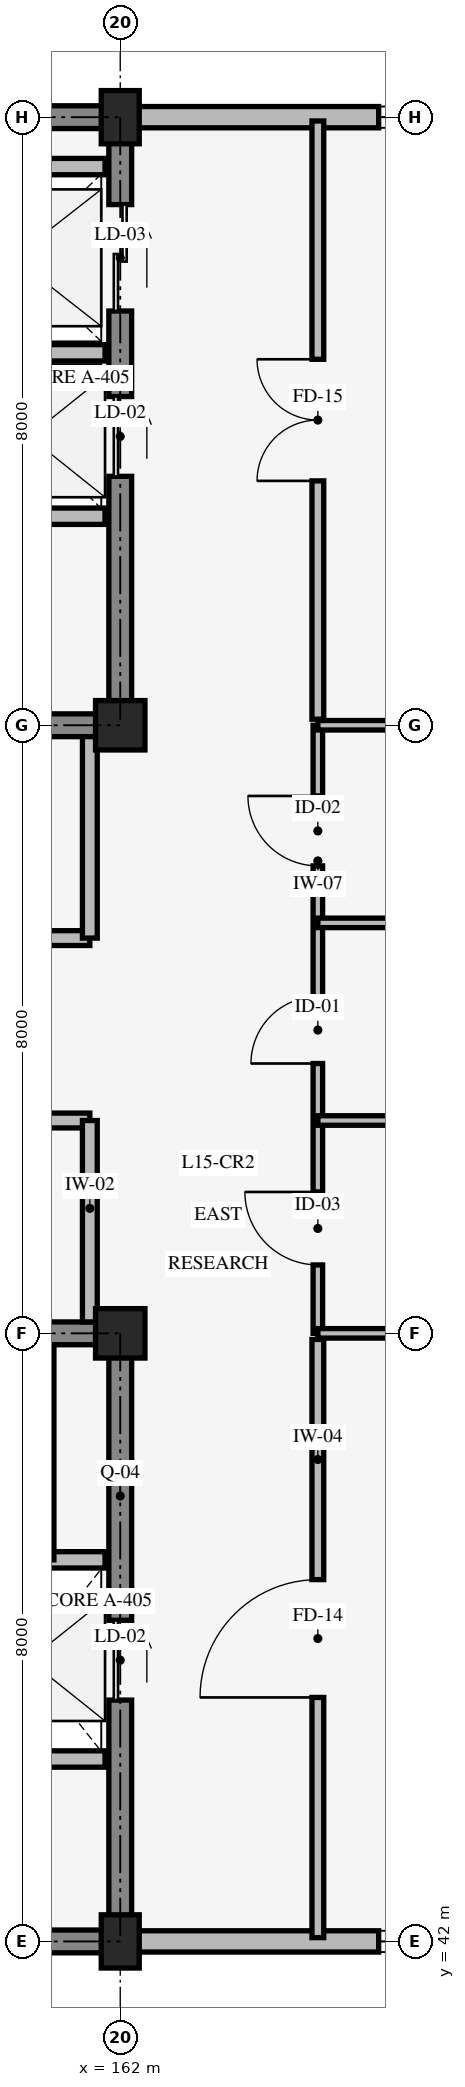
"""IFC4 building model, lengths in metres.
Left out: names, types, materials, properties, quantities, classifications, styles, units other than length and angle.
Written with IfcOpenShell. Run it as: python <this file> out.ifc"""

import sys

from ifc_helpers import new_model, si_unit, direction, frame, frame_2d, origin, origin_2d, place, context, subcontext, project, spatial, rectangle, extrude, element, fill, save


model = new_model("IFC4")
c1 = context("Model", 3, precision=1e-05, world=origin(), true_north=direction((0.0, 1.0)))
c2 = subcontext(c1, "Body", "Model", "MODEL_VIEW")
j1 = project(units=[si_unit("LENGTHUNIT", "METRE"), si_unit("PLANEANGLEUNIT", "RADIAN")], contexts=[c1])
p1 = place(None, origin())
s1 = spatial("IfcSite", under=j1, at=p1, CompositionType="ELEMENT")
p2 = place(p1, origin())
s2 = spatial("IfcBuilding", under=s1, at=p2, CompositionType="ELEMENT")
p3 = place(p2, frame((0.0, 0.0, 61.2)))
s3 = spatial("IfcBuildingStorey", under=s2, at=p3, CompositionType="ELEMENT", Elevation=61.2)
p4 = place(p3, frame((154.0, 42.0, 0.0), z_axis=(0.0, 0.0, 1.0), x_axis=(1.0, 0.0, 0.0)))
e1 = element("IfcWall", 1, at=p4, inside=s3, PredefinedType="SHEAR", context=c2, shape_type="SweptSolid", body=[
    extrude(rectangle(XDim=8.0, YDim=0.3, at=frame_2d((4.0, 0.0))), origin(), (0.0, 0.0, 1.0), 3.95),
])
p5 = place(p3, frame((162.0, 42.0, 0.0), z_axis=(0.0, 0.0, 1.0), x_axis=(0.0, 1.0, 0.0)))
e2 = element("IfcWall", 2, at=p5, inside=s3, PredefinedType="SHEAR", context=c2, shape_type="SweptSolid", body=[
    extrude(rectangle(XDim=8.0, YDim=0.3, at=frame_2d((4.0, 0.0))), origin(), (0.0, 0.0, 1.0), 3.95),
])
p6 = place(p5, frame((3.175, 0.0, 0.0)))
e3 = element("IfcOpeningElement", 3, at=p6, cuts=e2, PredefinedType="OPENING", context=c2, shape_type="SweptSolid", body=[
    extrude(rectangle(XDim=1.05, YDim=2.2, at=frame_2d((0.525, 1.1))), frame((0.0, 0.16, 0.0), z_axis=(0.0, -1.0, 0.0), x_axis=(1.0, 0.0, 0.0)), (0.0, 0.0, 1.0), 0.32),
])
p7 = place(p3, frame((162.0, 50.0, 0.0), z_axis=(0.0, 0.0, 1.0), x_axis=(-1.0, 0.0, 0.0)))
e4 = element("IfcWall", 4, at=p7, inside=s3, PredefinedType="SHEAR", context=c2, shape_type="SweptSolid", body=[
    extrude(rectangle(XDim=8.0, YDim=0.3, at=frame_2d((4.0, 0.0))), origin(), (0.0, 0.0, 1.0), 3.95),
])
p8 = place(p7, frame((5.3, 0.0, 0.0)))
e5 = element("IfcOpeningElement", 5, at=p8, cuts=e4, PredefinedType="OPENING", context=c2, shape_type="SweptSolid", body=[
    extrude(rectangle(XDim=1.3, YDim=2.15, at=frame_2d((0.65, 1.075))), frame((0.0, 0.16, 0.0), z_axis=(0.0, -1.0, 0.0), x_axis=(1.0, 0.0, 0.0)), (0.0, 0.0, 1.0), 0.32),
])
p9 = place(p7, frame((1.45, 0.0, 0.0)))
e6 = element("IfcOpeningElement", 6, at=p9, cuts=e4, PredefinedType="OPENING", context=c2, shape_type="SweptSolid", body=[
    extrude(rectangle(XDim=1.1, YDim=2.2, at=frame_2d((0.55, 1.1))), frame((0.0, 0.16, 0.0), z_axis=(0.0, -1.0, 0.0), x_axis=(1.0, 0.0, 0.0)), (0.0, 0.0, 1.0), 0.32),
])
p10 = place(p3, frame((154.0, 58.0, 0.0), z_axis=(0.0, 0.0, 1.0), x_axis=(1.0, 0.0, 0.0)))
e7 = element("IfcWall", 7, at=p10, inside=s3, PredefinedType="SHEAR", context=c2, shape_type="SweptSolid", body=[
    extrude(rectangle(XDim=8.0, YDim=0.3, at=frame_2d((4.0, 0.0))), origin(), (0.0, 0.0, 1.0), 3.95),
])
p11 = place(p10, frame((1.4, 0.0, 0.0)))
e8 = element("IfcOpeningElement", 8, at=p11, cuts=e7, PredefinedType="OPENING", context=c2, shape_type="SweptSolid", body=[
    extrude(rectangle(XDim=1.3, YDim=2.15, at=frame_2d((0.65, 1.075))), frame((0.0, 0.16, 0.0), z_axis=(0.0, -1.0, 0.0), x_axis=(1.0, 0.0, 0.0)), (0.0, 0.0, 1.0), 0.32),
])
p12 = place(p10, frame((5.3, 0.0, 0.0)))
e9 = element("IfcOpeningElement", 9, at=p12, cuts=e7, PredefinedType="OPENING", context=c2, shape_type="SweptSolid", body=[
    extrude(rectangle(XDim=1.1, YDim=2.2, at=frame_2d((0.55, 1.1))), frame((0.0, 0.16, 0.0), z_axis=(0.0, -1.0, 0.0), x_axis=(1.0, 0.0, 0.0)), (0.0, 0.0, 1.0), 0.32),
])
p13 = place(p3, frame((162.0, 58.0, 0.0), z_axis=(0.0, 0.0, 1.0), x_axis=(0.0, 1.0, 0.0)))
e10 = element("IfcWall", 10, at=p13, inside=s3, PredefinedType="SHEAR", context=c2, shape_type="SweptSolid", body=[
    extrude(rectangle(XDim=8.0, YDim=0.3, at=frame_2d((4.0, 0.0))), origin(), (0.0, 0.0, 1.0), 3.95),
])
p14 = place(p13, frame((3.275, 0.0, 0.0)))
e11 = element("IfcOpeningElement", 11, at=p14, cuts=e10, PredefinedType="OPENING", context=c2, shape_type="SweptSolid", body=[
    extrude(rectangle(XDim=1.05, YDim=2.2, at=frame_2d((0.525, 1.1))), frame((0.0, 0.16, 0.0), z_axis=(0.0, -1.0, 0.0), x_axis=(1.0, 0.0, 0.0)), (0.0, 0.0, 1.0), 0.32),
])
p15 = place(p13, frame((5.45, 0.0, 0.0)))
e12 = element("IfcOpeningElement", 12, at=p15, cuts=e10, PredefinedType="OPENING", context=c2, shape_type="SweptSolid", body=[
    extrude(rectangle(XDim=1.4, YDim=2.3, at=frame_2d((0.7, 1.15))), frame((0.0, 0.16, 0.0), z_axis=(0.0, -1.0, 0.0), x_axis=(1.0, 0.0, 0.0)), (0.0, 0.0, 1.0), 0.32),
])
p16 = place(p3, frame((162.0, 66.0, 0.0), z_axis=(0.0, 0.0, 1.0), x_axis=(-1.0, 0.0, 0.0)))
e13 = element("IfcWall", 13, at=p16, inside=s3, PredefinedType="SHEAR", context=c2, shape_type="SweptSolid", body=[
    extrude(rectangle(XDim=8.0, YDim=0.3, at=frame_2d((4.0, 0.0))), origin(), (0.0, 0.0, 1.0), 3.95),
])
p17 = place(p3, frame((162.0, 42.0, 0.0), z_axis=(0.0, 0.0, 1.0), x_axis=(1.0, 0.0, 0.0)))
e14 = element("IfcColumn", 14, at=p17, inside=s3, PredefinedType="COLUMN", context=c2, shape_type="SweptSolid", body=[
    extrude(rectangle(XDim=0.5, YDim=0.7, at=origin_2d()), origin(), (0.0, 0.0, 1.0), 4.2),
])
for number, where, z_axis, x_axis in (
    (15, (162.0, 50.0, 0.0), (0.0, 0.0, 1.0), (1.0, 0.0, 0.0)),
    (16, (162.0, 58.0, 0.0), (0.0, 0.0, 1.0), (1.0, 0.0, 0.0)),
):
    element("IfcColumn", number, at=place(p3, frame(where, z_axis=z_axis, x_axis=x_axis)), inside=s3, PredefinedType="COLUMN", context=c2, shape_type="SweptSolid", body=[
        extrude(rectangle(XDim=0.65, YDim=0.65, at=origin_2d()), origin(), (0.0, 0.0, 1.0), 4.2),
    ])
p18 = place(p3, frame((162.0, 66.0, 0.0), z_axis=(0.0, 0.0, 1.0), x_axis=(1.0, 0.0, 0.0)))
e17 = element("IfcColumn", 17, at=p18, inside=s3, PredefinedType="COLUMN", context=c2, shape_type="SweptSolid", body=[
    extrude(rectangle(XDim=0.5, YDim=0.7, at=origin_2d()), origin(), (0.0, 0.0, 1.0), 4.2),
])
p19 = place(p3, frame((170.0, 42.0, 0.0), z_axis=(0.0, 0.0, 1.0), x_axis=(-1.0, 0.0, 0.0)))
e18 = element("IfcWall", 18, at=p19, inside=s3, PredefinedType="STANDARD", context=c2, shape_type="SweptSolid", body=[
    extrude(rectangle(XDim=8.0, YDim=0.28, at=frame_2d((4.0, 0.0))), origin(), (0.0, 0.0, 1.0), 3.24),
])
p20 = place(p19, frame((3.4, 0.0, 0.85)))
e19 = element("IfcOpeningElement", 19, at=p20, cuts=e18, PredefinedType="OPENING", context=c2, shape_type="SweptSolid", body=[
    extrude(rectangle(XDim=1.2, YDim=1.2, at=frame_2d((0.6, 0.6))), frame((0.0, 0.15, 0.0), z_axis=(0.0, -1.0, 0.0), x_axis=(1.0, 0.0, 0.0)), (0.0, 0.0, 1.0), 0.3),
])
p21 = place(p3, frame((162.0, 66.0, 0.0), z_axis=(0.0, 0.0, 1.0), x_axis=(1.0, 0.0, 0.0)))
e20 = element("IfcWall", 20, at=p21, inside=s3, PredefinedType="STANDARD", context=c2, shape_type="SweptSolid", body=[
    extrude(rectangle(XDim=8.0, YDim=0.28, at=frame_2d((4.0, 0.0))), origin(), (0.0, 0.0, 1.0), 3.24),
])
p22 = place(p21, frame((3.4, 0.0, 0.85)))
e21 = element("IfcOpeningElement", 21, at=p22, cuts=e20, PredefinedType="OPENING", context=c2, shape_type="SweptSolid", body=[
    extrude(rectangle(XDim=1.2, YDim=1.2, at=frame_2d((0.6, 0.6))), frame((0.0, 0.15, 0.0), z_axis=(0.0, -1.0, 0.0), x_axis=(1.0, 0.0, 0.0)), (0.0, 0.0, 1.0), 0.3),
])
p23 = place(p3, frame((158.45, 47.02, 0.0), z_axis=(0.0, 0.0, 1.0), x_axis=(1.0, 0.0, 0.0)))
e22 = element("IfcWall", 22, at=p23, inside=s3, PredefinedType="STANDARD", context=c2, shape_type="SweptSolid", body=[
    extrude(rectangle(XDim=3.35, YDim=0.215, at=frame_2d((1.675, 0.0))), origin(), (0.0, 0.0, 1.0), 3.9),
])
p24 = place(p3, frame((161.02, 47.02, 0.0), z_axis=(0.0, 0.0, 1.0), x_axis=(0.0, 1.0, 0.0)))
e23 = element("IfcWall", 23, at=p24, inside=s3, PredefinedType="STANDARD", context=c2, shape_type="SweptSolid", body=[
    extrude(rectangle(XDim=2.78, YDim=0.215, at=frame_2d((1.39, 0.0))), origin(), (0.0, 0.0, 1.0), 3.9),
])
p25 = place(p3, frame((159.78, 44.4, 0.0), z_axis=(0.0, 0.0, 1.0), x_axis=(1.0, 0.0, 0.0)))
e24 = element("IfcWall", 24, at=p25, inside=s3, PredefinedType="STANDARD", context=c2, shape_type="SweptSolid", body=[
    extrude(rectangle(XDim=2.02, YDim=0.215, at=frame_2d((1.01, 0.0))), origin(), (0.0, 0.0, 1.0), 3.9),
])
p26 = place(p3, frame((158.45, 62.9, 0.0), z_axis=(0.0, 0.0, 1.0), x_axis=(1.0, 0.0, 0.0)))
e25 = element("IfcWall", 25, at=p26, inside=s3, PredefinedType="STANDARD", context=c2, shape_type="SweptSolid", body=[
    extrude(rectangle(XDim=3.35, YDim=0.215, at=frame_2d((1.675, 0.0))), origin(), (0.0, 0.0, 1.0), 3.9),
])
p27 = place(p3, frame((159.38, 65.35, 0.0), z_axis=(0.0, 0.0, 1.0), x_axis=(1.0, 0.0, 0.0)))
e26 = element("IfcWall", 26, at=p27, inside=s3, PredefinedType="STANDARD", context=c2, shape_type="SweptSolid", body=[
    extrude(rectangle(XDim=2.42, YDim=0.215, at=frame_2d((1.21, 0.0))), origin(), (0.0, 0.0, 1.0), 3.9),
])
p28 = place(p3, frame((158.45, 60.75, 0.0), z_axis=(0.0, 0.0, 1.0), x_axis=(1.0, 0.0, 0.0)))
e27 = element("IfcWall", 27, at=p28, inside=s3, PredefinedType="STANDARD", context=c2, shape_type="SweptSolid", body=[
    extrude(rectangle(XDim=3.35, YDim=0.215, at=frame_2d((1.675, 0.0))), origin(), (0.0, 0.0, 1.0), 3.9),
])
p29 = place(p3, frame((154.0, 52.8, 0.0), z_axis=(0.0, 0.0, 1.0), x_axis=(1.0, 0.0, 0.0)))
e28 = element("IfcWall", 28, at=p29, inside=s3, PredefinedType="STANDARD", context=c2, shape_type="SweptSolid", body=[
    extrude(rectangle(XDim=7.6, YDim=0.195, at=frame_2d((3.8, 0.0))), origin(), (0.0, 0.0, 1.0), 3.9),
])
p30 = place(p29, frame((2.8, 0.0, 0.0)))
e29 = element("IfcOpeningElement", 29, at=p30, cuts=e28, PredefinedType="OPENING", context=c2, shape_type="SweptSolid", body=[
    extrude(rectangle(XDim=1.35, YDim=2.15, at=frame_2d((0.675, 1.075))), frame((0.0, 0.107, 0.0), z_axis=(0.0, -1.0, 0.0), x_axis=(1.0, 0.0, 0.0)), (0.0, 0.0, 1.0), 0.215),
])
p31 = place(p3, frame((161.6, 50.15, 0.0), z_axis=(0.0, 0.0, 1.0), x_axis=(0.0, 1.0, 0.0)))
e30 = element("IfcWall", 30, at=p31, inside=s3, PredefinedType="STANDARD", context=c2, shape_type="SweptSolid", body=[
    extrude(rectangle(XDim=2.65, YDim=0.195, at=frame_2d((1.325, 0.0))), origin(), (0.0, 0.0, 1.0), 3.29),
])
p32 = place(p3, frame((154.0, 55.2, 0.0), z_axis=(0.0, 0.0, 1.0), x_axis=(1.0, 0.0, 0.0)))
e31 = element("IfcWall", 31, at=p32, inside=s3, PredefinedType="STANDARD", context=c2, shape_type="SweptSolid", body=[
    extrude(rectangle(XDim=7.6, YDim=0.195, at=frame_2d((3.8, 0.0))), origin(), (0.0, 0.0, 1.0), 3.9),
])
p33 = place(p32, frame((2.8, 0.0, 0.0)))
e32 = element("IfcOpeningElement", 32, at=p33, cuts=e31, PredefinedType="OPENING", context=c2, shape_type="SweptSolid", body=[
    extrude(rectangle(XDim=1.45, YDim=2.2, at=frame_2d((0.725, 1.1))), frame((0.0, 0.107, 0.0), z_axis=(0.0, -1.0, 0.0), x_axis=(1.0, 0.0, 0.0)), (0.0, 0.0, 1.0), 0.215),
])
p34 = place(p3, frame((161.6, 55.2, 0.0), z_axis=(0.0, 0.0, 1.0), x_axis=(0.0, 1.0, 0.0)))
e33 = element("IfcWall", 33, at=p34, inside=s3, PredefinedType="STANDARD", context=c2, shape_type="SweptSolid", body=[
    extrude(rectangle(XDim=2.65, YDim=0.195, at=frame_2d((1.325, 0.0))), origin(), (0.0, 0.0, 1.0), 3.29),
])
p35 = place(p3, frame((164.6, 50.0, 0.0), z_axis=(0.0, 0.0, 1.0), x_axis=(0.0, 1.0, 0.0)))
e34 = element("IfcWall", 34, at=p35, inside=s3, PredefinedType="STANDARD", context=c2, shape_type="SweptSolid", body=[
    extrude(rectangle(XDim=8.0, YDim=0.125, at=frame_2d((4.0, 0.0))), origin(), (0.0, 0.0, 1.0), 3.9),
])
p36 = place(p35, frame((0.9, 0.0, 0.0)))
e35 = element("IfcOpeningElement", 35, at=p36, cuts=e34, PredefinedType="OPENING", context=c2, shape_type="SweptSolid", body=[
    extrude(rectangle(XDim=0.96, YDim=2.08, at=frame_2d((0.48, 1.04))), frame((0.0, 0.073, 0.0), z_axis=(0.0, -1.0, 0.0), x_axis=(1.0, 0.0, 0.0)), (0.0, 0.0, 1.0), 0.145),
])
p37 = place(p35, frame((3.55, 0.0, 0.0)))
e36 = element("IfcOpeningElement", 36, at=p37, cuts=e34, PredefinedType="OPENING", context=c2, shape_type="SweptSolid", body=[
    extrude(rectangle(XDim=0.88, YDim=2.05, at=frame_2d((0.44, 1.025))), frame((0.0, 0.073, 0.0), z_axis=(0.0, -1.0, 0.0), x_axis=(1.0, 0.0, 0.0)), (0.0, 0.0, 1.0), 0.145),
])
p38 = place(p35, frame((6.15, 0.0, 0.0)))
e37 = element("IfcOpeningElement", 37, at=p38, cuts=e34, PredefinedType="OPENING", context=c2, shape_type="SweptSolid", body=[
    extrude(rectangle(XDim=0.92, YDim=2.05, at=frame_2d((0.46, 1.025))), frame((0.0, 0.073, 0.0), z_axis=(0.0, -1.0, 0.0), x_axis=(1.0, 0.0, 0.0)), (0.0, 0.0, 1.0), 0.145),
])
p39 = place(p3, frame((164.6, 50.0, 0.0), z_axis=(0.0, 0.0, 1.0), x_axis=(1.0, 0.0, 0.0)))
e38 = element("IfcWall", 38, at=p39, inside=s3, PredefinedType="STANDARD", context=c2, shape_type="SweptSolid", body=[
    extrude(rectangle(XDim=3.8, YDim=0.125, at=frame_2d((1.9, 0.0))), origin(), (0.0, 0.0, 1.0), 3.24),
])
for number, where, z_axis, x_axis in (
    (39, (164.6, 52.8, 0.0), (0.0, 0.0, 1.0), (1.0, 0.0, 0.0)),
    (40, (164.6, 55.4, 0.0), (0.0, 0.0, 1.0), (1.0, 0.0, 0.0)),
):
    element("IfcWall", number, at=place(p3, frame(where, z_axis=z_axis, x_axis=x_axis)), inside=s3, PredefinedType="STANDARD", context=c2, shape_type="SweptSolid", body=[
        extrude(rectangle(XDim=3.8, YDim=0.125, at=frame_2d((1.9, 0.0))), origin(), (0.0, 0.0, 1.0), 3.9),
    ])
p40 = place(p3, frame((164.6, 58.0, 0.0), z_axis=(0.0, 0.0, 1.0), x_axis=(1.0, 0.0, 0.0)))
e41 = element("IfcWall", 41, at=p40, inside=s3, PredefinedType="STANDARD", context=c2, shape_type="SweptSolid", body=[
    extrude(rectangle(XDim=3.8, YDim=0.125, at=frame_2d((1.9, 0.0))), origin(), (0.0, 0.0, 1.0), 3.24),
])
p41 = place(p3, frame((164.6, 42.05, 0.0), z_axis=(0.0, 0.0, 1.0), x_axis=(0.0, 1.0, 0.0)))
e42 = element("IfcWall", 42, at=p41, inside=s3, PredefinedType="STANDARD", context=c2, shape_type="SweptSolid", body=[
    extrude(rectangle(XDim=7.87, YDim=0.155, at=frame_2d((3.935, 0.0))), origin(), (0.0, 0.0, 1.0), 3.9),
])
p42 = place(p41, frame((3.16, 0.0, 0.0)))
e43 = element("IfcOpeningElement", 43, at=p42, cuts=e42, PredefinedType="OPENING", context=c2, shape_type="SweptSolid", body=[
    extrude(rectangle(XDim=1.55, YDim=2.25, at=frame_2d((0.775, 1.125))), frame((0.0, 0.087, 0.0), z_axis=(0.0, -1.0, 0.0), x_axis=(1.0, 0.0, 0.0)), (0.0, 0.0, 1.0), 0.175),
])
p43 = place(p3, frame((164.6, 58.08, 0.0), z_axis=(0.0, 0.0, 1.0), x_axis=(0.0, 1.0, 0.0)))
e44 = element("IfcWall", 44, at=p43, inside=s3, PredefinedType="STANDARD", context=c2, shape_type="SweptSolid", body=[
    extrude(rectangle(XDim=7.87, YDim=0.155, at=frame_2d((3.935, 0.0))), origin(), (0.0, 0.0, 1.0), 3.9),
])
p44 = place(p43, frame((3.135, 0.0, 0.0)))
e45 = element("IfcOpeningElement", 45, at=p44, cuts=e44, PredefinedType="OPENING", context=c2, shape_type="SweptSolid", body=[
    extrude(rectangle(XDim=1.6, YDim=2.25, at=frame_2d((0.8, 1.125))), frame((0.0, 0.087, 0.0), z_axis=(0.0, -1.0, 0.0), x_axis=(1.0, 0.0, 0.0)), (0.0, 0.0, 1.0), 0.175),
])
p45 = place(p20, origin())
e46 = element("IfcWindow", 46, at=p45, inside=s3, PartitioningType="SINGLE_PANEL", PredefinedType="WINDOW", context=c2, shape_type="SweptSolid", body=[
    extrude(rectangle(XDim=1.2, YDim=1.2, at=frame_2d((0.6, 0.6))), frame((0.0, 0.03, 0.0), z_axis=(0.0, -1.0, 0.0), x_axis=(1.0, 0.0, 0.0)), (0.0, 0.0, 1.0), 0.06),
])
fill(e19, e46)
p46 = place(p22, origin())
e47 = element("IfcWindow", 47, at=p46, inside=s3, PartitioningType="SINGLE_PANEL", PredefinedType="WINDOW", context=c2, shape_type="SweptSolid", body=[
    extrude(rectangle(XDim=1.2, YDim=1.2, at=frame_2d((0.6, 0.6))), frame((0.0, 0.03, 0.0), z_axis=(0.0, -1.0, 0.0), x_axis=(1.0, 0.0, 0.0)), (0.0, 0.0, 1.0), 0.06),
])
fill(e21, e47)
p47 = place(p6, origin())
e48 = element("IfcDoor", 48, at=p47, inside=s3, OperationType="SLIDING_TO_LEFT", PredefinedType="DOOR", context=c2, shape_type="SweptSolid", body=[
    extrude(rectangle(XDim=1.05, YDim=2.2, at=frame_2d((0.525, 1.1))), frame((0.0, 0.025, 0.0), z_axis=(0.0, -1.0, 0.0), x_axis=(1.0, 0.0, 0.0)), (0.0, 0.0, 1.0), 0.05),
])
fill(e3, e48)
p48 = place(p14, origin())
e49 = element("IfcDoor", 49, at=p48, inside=s3, OperationType="SLIDING_TO_RIGHT", PredefinedType="DOOR", context=c2, shape_type="SweptSolid", body=[
    extrude(rectangle(XDim=1.05, YDim=2.2, at=frame_2d((0.525, 1.1))), frame((0.0, 0.025, 0.0), z_axis=(0.0, -1.0, 0.0), x_axis=(1.0, 0.0, 0.0)), (0.0, 0.0, 1.0), 0.05),
])
fill(e11, e49)
p49 = place(p15, origin())
e50 = element("IfcDoor", 50, at=p49, inside=s3, OperationType="DOUBLE_DOOR_SLIDING", PredefinedType="DOOR", context=c2, shape_type="SweptSolid", body=[
    extrude(rectangle(XDim=1.4, YDim=2.3, at=frame_2d((0.7, 1.15))), frame((0.0, 0.025, 0.0), z_axis=(0.0, -1.0, 0.0), x_axis=(1.0, 0.0, 0.0)), (0.0, 0.0, 1.0), 0.05),
])
fill(e12, e50)
p50 = place(p36, origin())
e51 = element("IfcDoor", 51, at=p50, inside=s3, OperationType="SINGLE_SWING_RIGHT", PredefinedType="DOOR", context=c2, shape_type="SweptSolid", body=[
    extrude(rectangle(XDim=0.96, YDim=2.08, at=frame_2d((0.48, 1.04))), frame((0.0, 0.025, 0.0), z_axis=(0.0, -1.0, 0.0), x_axis=(1.0, 0.0, 0.0)), (0.0, 0.0, 1.0), 0.05),
])
fill(e35, e51)
p51 = place(p37, origin())
e52 = element("IfcDoor", 52, at=p51, inside=s3, OperationType="SINGLE_SWING_LEFT", PredefinedType="DOOR", context=c2, shape_type="SweptSolid", body=[
    extrude(rectangle(XDim=0.88, YDim=2.05, at=frame_2d((0.44, 1.025))), frame((0.0, 0.025, 0.0), z_axis=(0.0, -1.0, 0.0), x_axis=(1.0, 0.0, 0.0)), (0.0, 0.0, 1.0), 0.05),
])
fill(e36, e52)
p52 = place(p38, origin())
e53 = element("IfcDoor", 53, at=p52, inside=s3, OperationType="SINGLE_SWING_RIGHT", PredefinedType="DOOR", context=c2, shape_type="SweptSolid", body=[
    extrude(rectangle(XDim=0.92, YDim=2.05, at=frame_2d((0.46, 1.025))), frame((0.0, 0.025, 0.0), z_axis=(0.0, -1.0, 0.0), x_axis=(1.0, 0.0, 0.0)), (0.0, 0.0, 1.0), 0.05),
])
fill(e37, e53)
p53 = place(p42, origin())
e54 = element("IfcDoor", 54, at=p53, inside=s3, OperationType="SINGLE_SWING_LEFT", PredefinedType="DOOR", context=c2, shape_type="SweptSolid", body=[
    extrude(rectangle(XDim=1.55, YDim=2.25, at=frame_2d((0.775, 1.125))), frame((0.0, 0.025, 0.0), z_axis=(0.0, -1.0, 0.0), x_axis=(1.0, 0.0, 0.0)), (0.0, 0.0, 1.0), 0.05),
])
fill(e43, e54)
p54 = place(p44, origin())
e55 = element("IfcDoor", 55, at=p54, inside=s3, OperationType="DOUBLE_DOOR_SINGLE_SWING", PredefinedType="DOOR", context=c2, shape_type="SweptSolid", body=[
    extrude(rectangle(XDim=1.6, YDim=2.25, at=frame_2d((0.8, 1.125))), frame((0.0, 0.025, 0.0), z_axis=(0.0, -1.0, 0.0), x_axis=(1.0, 0.0, 0.0)), (0.0, 0.0, 1.0), 0.05),
])
fill(e45, e55)
save(model, sys.argv[1])
